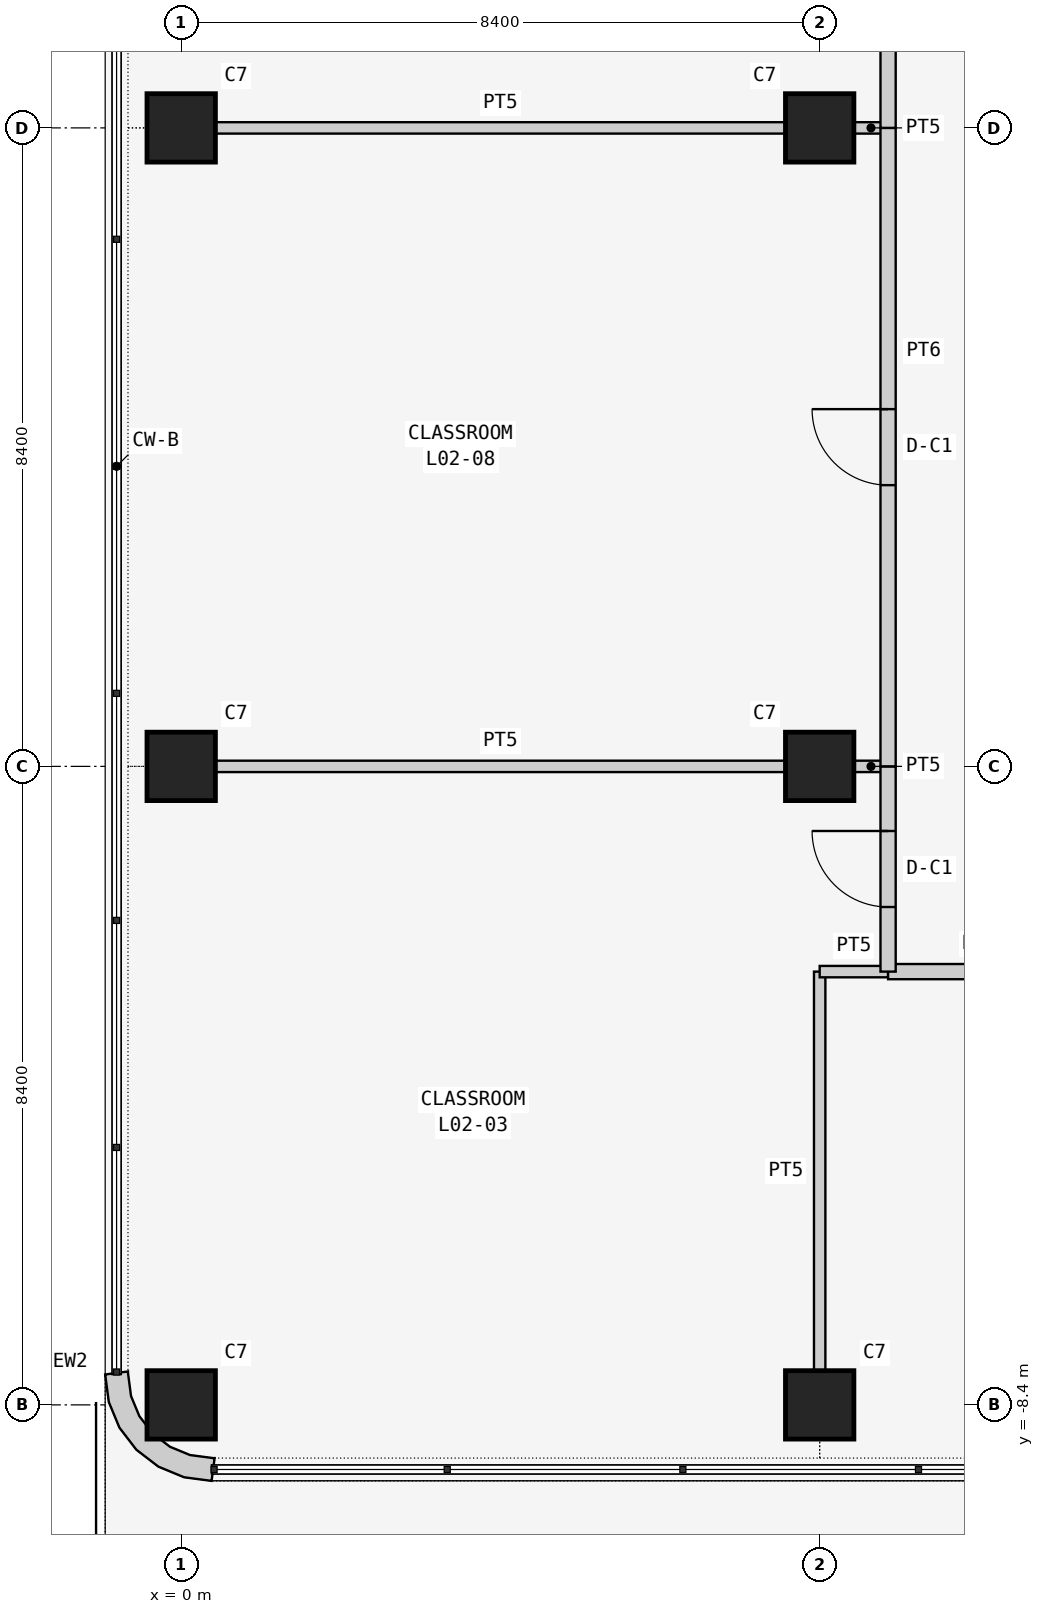
"""IFC4 building model, lengths in metres.
Left out: names, types, materials, properties, quantities, classifications, styles, units other than length and angle.
Written with IfcOpenShell. Run it as: python <this file> out.ifc"""

import sys

from ifc_helpers import new_model, si_unit, direction, frame, frame_2d, origin, origin_2d, place, context, subcontext, project, spatial, polyline, rectangle, outline, extrude, element, fill, save


model = new_model("IFC4")
c1 = context("Model", 3, precision=1e-05, world=origin(), true_north=direction((0.0, 1.0)))
c2 = subcontext(c1, "Body", "Model", "MODEL_VIEW")
j1 = project(units=[si_unit("LENGTHUNIT", "METRE"), si_unit("PLANEANGLEUNIT", "RADIAN")], contexts=[c1])
p1 = place(None, origin())
s1 = spatial("IfcSite", under=j1, at=p1, CompositionType="ELEMENT")
p2 = place(p1, origin())
s2 = spatial("IfcBuilding", under=s1, at=p2, CompositionType="ELEMENT")
p3 = place(p2, frame((0.0, 0.0, 10.5)))
s3 = spatial("IfcBuildingStorey", under=s2, at=p3, CompositionType="ELEMENT", Elevation=10.5)
for number, where, z_axis, x_axis in (
    (1, (0.0, -8.4, 0.0), (0.0, 0.0, 1.0), (1.0, 0.0, 0.0)),
    (2, (0.0, 0.0, 0.0), (0.0, 0.0, 1.0), (1.0, 0.0, 0.0)),
    (3, (0.0, 8.4, 0.0), (0.0, 0.0, 1.0), (1.0, 0.0, 0.0)),
    (4, (8.4, -8.4, 0.0), (0.0, 0.0, 1.0), (1.0, 0.0, 0.0)),
    (5, (8.4, 0.0, 0.0), (0.0, 0.0, 1.0), (1.0, 0.0, 0.0)),
    (6, (8.4, 8.4, 0.0), (0.0, 0.0, 1.0), (1.0, 0.0, 0.0)),
):
    element("IfcColumn", number, at=place(p3, frame(where, z_axis=z_axis, x_axis=x_axis)), inside=s3, PredefinedType="COLUMN", context=c2, shape_type="SweptSolid", body=[
        extrude(rectangle(XDim=0.9, YDim=0.9, at=origin_2d()), origin(), (0.0, 0.0, 1.0), 4.5),
    ])
p4 = place(p3, frame((-0.848, -7.955, 0.0), z_axis=(0.0, 0.0, 1.0), x_axis=(-0.707106781187, -0.707106781187, 0.0)))
e7 = element("IfcWall", 7, at=p4, inside=s3, PredefinedType="SOLIDWALL", context=c2, shape_type="SweptSolid", body=[
    extrude(outline(polyline([(0.139, 1.904), (-0.101, 1.72), (-0.087, 1.706), (0.1, 1.463), (0.209, 1.198), (0.247, 0.914), (0.209, 0.63), (0.1, 0.365), (-0.087, 0.122), (-0.101, 0.108), (0.139, -0.076), (0.362, 0.214), (0.502, 0.552), (0.549, 0.914), (0.502, 1.276), (0.362, 1.614), (0.139, 1.904)])), origin(), (0.0, 0.0, 1.0), 4.3),
])
p5 = place(p3, frame((8.4, -7.95, 0.0), z_axis=(0.0, 0.0, 1.0), x_axis=(0.0, 1.0, 0.0)))
e8 = element("IfcWall", 8, at=p5, inside=s3, PredefinedType="PARTITIONING", context=c2, shape_type="SweptSolid", body=[
    extrude(rectangle(XDim=5.25, YDim=0.15, at=frame_2d((2.625, 0.0))), origin(), (0.0, 0.0, 1.0), 3.543),
])
p6 = place(p3, frame((8.4, -2.7, 0.0), z_axis=(0.0, 0.0, 1.0), x_axis=(1.0, 0.0, 0.0)))
e9 = element("IfcWall", 9, at=p6, inside=s3, PredefinedType="PARTITIONING", context=c2, shape_type="SweptSolid", body=[
    extrude(rectangle(XDim=0.9, YDim=0.15, at=frame_2d((0.45, 0.0))), origin(), (0.0, 0.0, 1.0), 4.3),
])
p7 = place(p3, frame((9.3, -2.7, 0.0), z_axis=(0.0, 0.0, 1.0), x_axis=(1.0, 0.0, 0.0)))
e10 = element("IfcWall", 10, at=p7, inside=s3, PredefinedType="PARTITIONING", context=c2, shape_type="SweptSolid", body=[
    extrude(rectangle(XDim=2.4, YDim=0.2, at=frame_2d((1.2, 0.0))), origin(), (0.0, 0.0, 1.0), 4.3),
])
p8 = place(p3, frame((0.45, 0.0, 0.0), z_axis=(0.0, 0.0, 1.0), x_axis=(1.0, 0.0, 0.0)))
e11 = element("IfcWall", 11, at=p8, inside=s3, PredefinedType="PARTITIONING", context=c2, shape_type="SweptSolid", body=[
    extrude(rectangle(XDim=7.5, YDim=0.15, at=frame_2d((3.75, 0.0))), origin(), (0.0, 0.0, 1.0), 3.543),
])
p9 = place(p3, frame((8.85, 0.0, 0.0), z_axis=(0.0, 0.0, 1.0), x_axis=(1.0, 0.0, 0.0)))
e12 = element("IfcWall", 12, at=p9, inside=s3, PredefinedType="PARTITIONING", context=c2, shape_type="SweptSolid", body=[
    extrude(rectangle(XDim=0.45, YDim=0.15, at=frame_2d((0.225, 0.0))), origin(), (0.0, 0.0, 1.0), 3.543),
])
p10 = place(p3, frame((9.3, 0.0, 0.0), z_axis=(0.0, 0.0, 1.0), x_axis=(0.0, -1.0, 0.0)))
e13 = element("IfcWall", 13, at=p10, inside=s3, PredefinedType="PARTITIONING", context=c2, shape_type="SweptSolid", body=[
    extrude(rectangle(XDim=2.7, YDim=0.2, at=frame_2d((1.35, 0.0))), origin(), (0.0, 0.0, 1.0), 4.3),
])
p11 = place(p10, frame((0.85, 0.0, 0.0)))
e14 = element("IfcOpeningElement", 14, at=p11, cuts=e13, PredefinedType="OPENING", context=c2, shape_type="SweptSolid", body=[
    extrude(rectangle(XDim=1.0, YDim=2.1, at=frame_2d((0.5, 1.05))), frame((0.0, 0.11, 0.0), z_axis=(0.0, -1.0, 0.0), x_axis=(1.0, 0.0, 0.0)), (0.0, 0.0, 1.0), 0.22),
])
p12 = place(p3, frame((0.45, 8.4, 0.0), z_axis=(0.0, 0.0, 1.0), x_axis=(1.0, 0.0, 0.0)))
e15 = element("IfcWall", 15, at=p12, inside=s3, PredefinedType="PARTITIONING", context=c2, shape_type="SweptSolid", body=[
    extrude(rectangle(XDim=7.5, YDim=0.15, at=frame_2d((3.75, 0.0))), origin(), (0.0, 0.0, 1.0), 3.543),
])
p13 = place(p3, frame((8.85, 8.4, 0.0), z_axis=(0.0, 0.0, 1.0), x_axis=(1.0, 0.0, 0.0)))
e16 = element("IfcWall", 16, at=p13, inside=s3, PredefinedType="PARTITIONING", context=c2, shape_type="SweptSolid", body=[
    extrude(rectangle(XDim=0.45, YDim=0.15, at=frame_2d((0.225, 0.0))), origin(), (0.0, 0.0, 1.0), 3.543),
])
p14 = place(p3, frame((9.3, 8.4, 0.0), z_axis=(0.0, 0.0, 1.0), x_axis=(0.0, -1.0, 0.0)))
e17 = element("IfcWall", 17, at=p14, inside=s3, PredefinedType="PARTITIONING", context=c2, shape_type="SweptSolid", body=[
    extrude(rectangle(XDim=8.4, YDim=0.2, at=frame_2d((4.2, 0.0))), origin(), (0.0, 0.0, 1.0), 4.3),
])
p15 = place(p14, frame((3.7, 0.0, 0.0)))
e18 = element("IfcOpeningElement", 18, at=p15, cuts=e17, PredefinedType="OPENING", context=c2, shape_type="SweptSolid", body=[
    extrude(rectangle(XDim=1.0, YDim=2.1, at=frame_2d((0.5, 1.05))), frame((0.0, 0.11, 0.0), z_axis=(0.0, -1.0, 0.0), x_axis=(1.0, 0.0, 0.0)), (0.0, 0.0, 1.0), 0.22),
])
p16 = place(p3, frame((9.3, 15.9, 0.0), z_axis=(0.0, 0.0, 1.0), x_axis=(0.0, -1.0, 0.0)))
e19 = element("IfcWall", 19, at=p16, inside=s3, PredefinedType="PARTITIONING", context=c2, shape_type="SweptSolid", body=[
    extrude(rectangle(XDim=7.5, YDim=0.2, at=frame_2d((3.75, 0.0))), origin(), (0.0, 0.0, 1.0), 4.3),
])
p17 = place(p16, frame((3.25, 0.0, 0.0)))
e20 = element("IfcOpeningElement", 20, at=p17, cuts=e19, PredefinedType="OPENING", context=c2, shape_type="SweptSolid", body=[
    extrude(rectangle(XDim=1.0, YDim=2.1, at=frame_2d((0.5, 1.05))), frame((0.0, 0.11, 0.0), z_axis=(0.0, -1.0, 0.0), x_axis=(1.0, 0.0, 0.0)), (0.0, 0.0, 1.0), 0.22),
])
p18 = place(p11, frame((1.0, 0.0, 0.0), z_axis=(0.0, 0.0, 1.0), x_axis=(-1.0, 0.0, 0.0)))
e21 = element("IfcDoor", 21, at=p18, inside=s3, OperationType="SINGLE_SWING_RIGHT", PredefinedType="DOOR", context=c2, shape_type="SweptSolid", body=[
    extrude(rectangle(XDim=1.0, YDim=2.1, at=frame_2d((0.5, 1.05))), frame((0.0, 0.025, 0.0), z_axis=(0.0, -1.0, 0.0), x_axis=(1.0, 0.0, 0.0)), (0.0, 0.0, 1.0), 0.05),
])
fill(e14, e21)
p19 = place(p15, frame((1.0, 0.0, 0.0), z_axis=(0.0, 0.0, 1.0), x_axis=(-1.0, 0.0, 0.0)))
e22 = element("IfcDoor", 22, at=p19, inside=s3, OperationType="SINGLE_SWING_RIGHT", PredefinedType="DOOR", context=c2, shape_type="SweptSolid", body=[
    extrude(rectangle(XDim=1.0, YDim=2.1, at=frame_2d((0.5, 1.05))), frame((0.0, 0.025, 0.0), z_axis=(0.0, -1.0, 0.0), x_axis=(1.0, 0.0, 0.0)), (0.0, 0.0, 1.0), 0.05),
])
fill(e18, e22)
save(model, sys.argv[1])
